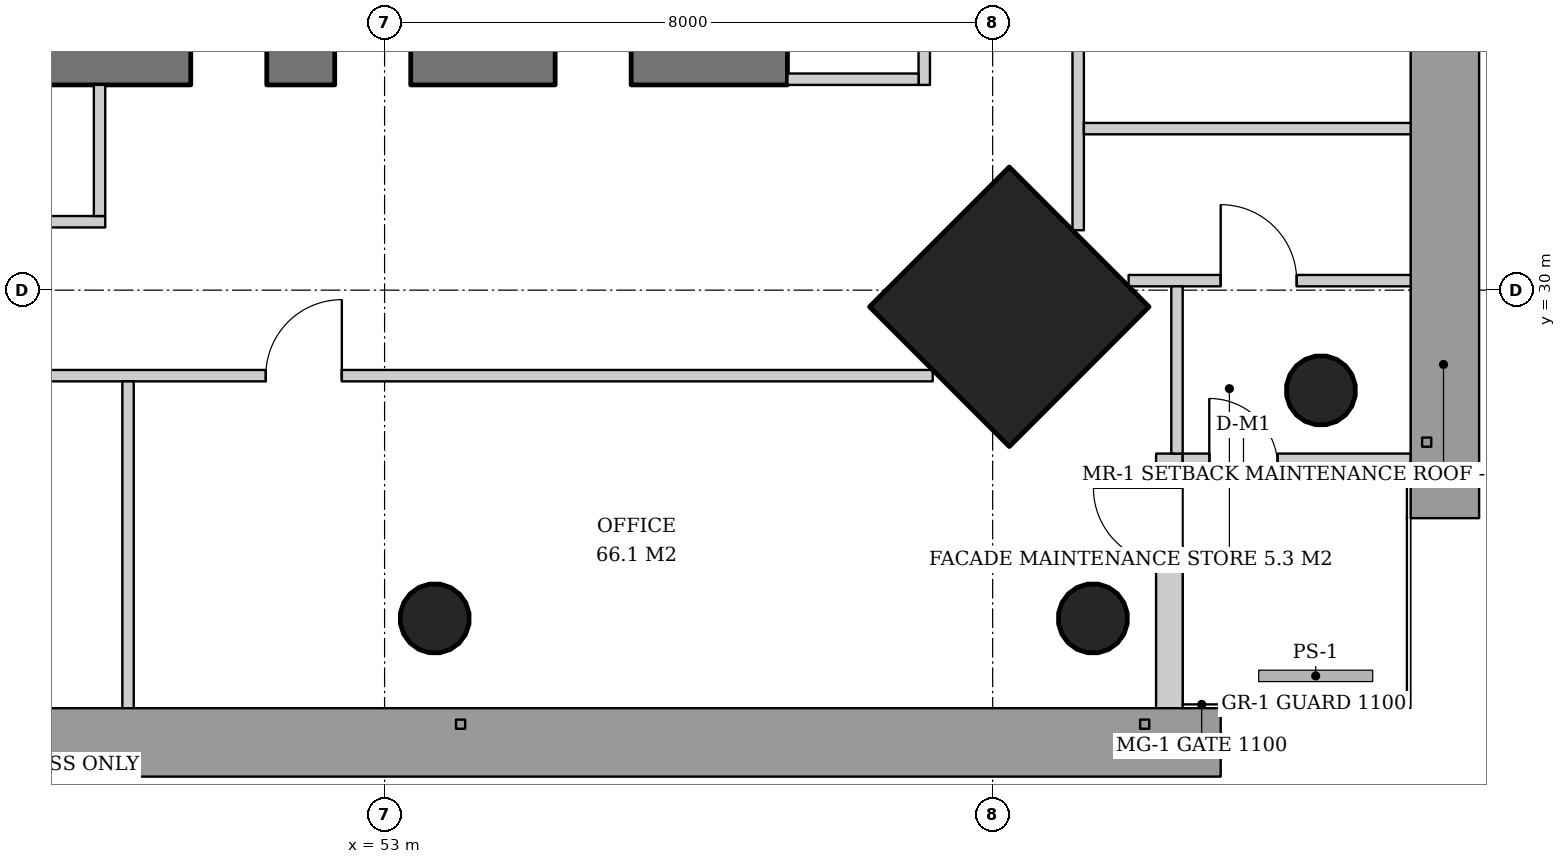
"""IFC4 building model, lengths in metres.
Left out: names, types, materials, properties, quantities, classifications, styles, units other than length and angle.
Written with IfcOpenShell. Run it as: python <this file> out.ifc"""

import sys

from ifc_helpers import new_model, si_unit, direction, frame, frame_2d, origin, origin_2d, place, context, subcontext, project, spatial, rectangle, hollow_circle, extrude, element, fill, save


model = new_model("IFC4")
c1 = context("Model", 3, precision=1e-05, world=origin(), true_north=direction((0.0, 1.0)))
c2 = subcontext(c1, "Body", "Model", "MODEL_VIEW")
j1 = project(units=[si_unit("LENGTHUNIT", "METRE"), si_unit("PLANEANGLEUNIT", "RADIAN")], contexts=[c1])
p1 = place(None, origin())
s1 = spatial("IfcSite", under=j1, at=p1, CompositionType="ELEMENT")
p2 = place(p1, origin())
s2 = spatial("IfcBuilding", under=s1, at=p2, CompositionType="ELEMENT")
p3 = place(p2, frame((0.0, 0.0, 135.0)))
s3 = spatial("IfcBuildingStorey", under=s2, at=p3, CompositionType="ELEMENT", Elevation=135.0)
p4 = place(p3, frame((65.357, 28.643, 0.0), z_axis=(-0.031962158256, 0.031962158256, 0.998977898093), x_axis=(-0.707106781187, -0.707106781187, 0.0)))
e1 = element("IfcColumn", 1, at=p4, inside=s3, PredefinedType="COLUMN", context=c2, shape_type="SweptSolid", body=[
    extrude(hollow_circle(Radius=0.457, WallThickness=0.03, at=origin_2d()), origin(), (0.0, 0.0, 1.0), 3.804),
])
p5 = place(p3, frame((61.257, 29.743, 0.0), z_axis=(-0.031898107953, 0.031898107953, 0.998981992539), x_axis=(-0.707106781187, -0.707106781187, 0.0)))
e2 = element("IfcColumn", 2, at=p5, inside=s3, PredefinedType="COLUMN", context=c2, shape_type="SweptSolid", body=[
    extrude(rectangle(XDim=2.6, YDim=2.6, at=origin_2d()), origin(), (0.0, 0.0, 1.0), 3.804),
])
p6 = place(p3, frame((62.357, 25.643, 0.0), z_axis=(-0.031962158256, 0.031962158256, 0.998977898093), x_axis=(-0.707106781187, -0.707106781187, 0.0)))
e3 = element("IfcColumn", 3, at=p6, inside=s3, PredefinedType="COLUMN", context=c2, shape_type="SweptSolid", body=[
    extrude(hollow_circle(Radius=0.457, WallThickness=0.03, at=origin_2d()), origin(), (0.0, 0.0, 1.0), 3.804),
])
p7 = place(p3, frame((53.678, 25.643, 0.0), z_axis=(-0.015923015547, 0.031974442509, 0.999361842679), x_axis=(-0.895145027055, -0.445775033553, 0.0)))
e4 = element("IfcColumn", 4, at=p7, inside=s3, PredefinedType="COLUMN", context=c2, shape_type="SweptSolid", body=[
    extrude(hollow_circle(Radius=0.457, WallThickness=0.03, at=origin_2d()), origin(), (0.0, 0.0, 1.0), 3.802),
])
p8 = place(p3, frame((31.7, 33.05, 0.0), z_axis=(0.0, 0.0, 1.0), x_axis=(1.0, 0.0, 0.0)))
e5 = element("IfcWall", 5, at=p8, inside=s3, PredefinedType="SHEAR", context=c2, shape_type="SweptSolid", body=[
    extrude(rectangle(XDim=26.6, YDim=0.7, at=frame_2d((13.3, 0.0))), origin(), (0.0, 0.0, 1.0), 3.8),
])
p9 = place(p8, frame((7.3, 0.0, 0.0)))
e6 = element("IfcOpeningElement", 6, at=p9, cuts=e5, PredefinedType="OPENING", context=c2, shape_type="SweptSolid", body=[
    extrude(rectangle(XDim=1.0, YDim=2.1, at=frame_2d((0.5, 1.05))), frame((0.0, 0.36, 0.0), z_axis=(0.0, -1.0, 0.0), x_axis=(1.0, 0.0, 0.0)), (0.0, 0.0, 1.0), 0.72),
])
p10 = place(p8, frame((18.75, 0.0, 0.0)))
e7 = element("IfcOpeningElement", 7, at=p10, cuts=e5, PredefinedType="OPENING", context=c2, shape_type="SweptSolid", body=[
    extrude(rectangle(XDim=1.0, YDim=2.1, at=frame_2d((0.5, 1.05))), frame((0.0, 0.36, 0.0), z_axis=(0.0, -1.0, 0.0), x_axis=(1.0, 0.0, 0.0)), (0.0, 0.0, 1.0), 0.72),
])
p11 = place(p8, frame((1.85, 0.0, 0.0)))
e8 = element("IfcOpeningElement", 8, at=p11, cuts=e5, PredefinedType="OPENING", context=c2, shape_type="SweptSolid", body=[
    extrude(rectangle(XDim=1.0, YDim=2.1, at=frame_2d((0.5, 1.05))), frame((0.0, 0.36, 0.0), z_axis=(0.0, -1.0, 0.0), x_axis=(1.0, 0.0, 0.0)), (0.0, 0.0, 1.0), 0.72),
])
p12 = place(p8, frame((4.7, 0.0, 0.0)))
e9 = element("IfcOpeningElement", 9, at=p12, cuts=e5, PredefinedType="OPENING", context=c2, shape_type="SweptSolid", body=[
    extrude(rectangle(XDim=1.0, YDim=2.1, at=frame_2d((0.5, 1.05))), frame((0.0, 0.36, 0.0), z_axis=(0.0, -1.0, 0.0), x_axis=(1.0, 0.0, 0.0)), (0.0, 0.0, 1.0), 0.72),
])
p13 = place(p8, frame((12.44, 0.0, 0.0)))
e10 = element("IfcOpeningElement", 10, at=p13, cuts=e5, PredefinedType="OPENING", context=c2, shape_type="SweptSolid", body=[
    extrude(rectangle(XDim=1.0, YDim=2.1, at=frame_2d((0.5, 1.05))), frame((0.0, 0.36, 0.0), z_axis=(0.0, -1.0, 0.0), x_axis=(1.0, 0.0, 0.0)), (0.0, 0.0, 1.0), 0.72),
])
p14 = place(p8, frame((20.644, 0.0, 0.0)))
e11 = element("IfcOpeningElement", 11, at=p14, cuts=e5, PredefinedType="OPENING", context=c2, shape_type="SweptSolid", body=[
    extrude(rectangle(XDim=1.0, YDim=2.1, at=frame_2d((0.5, 1.05))), frame((0.0, 0.36, 0.0), z_axis=(0.0, -1.0, 0.0), x_axis=(1.0, 0.0, 0.0)), (0.0, 0.0, 1.0), 0.72),
])
p15 = place(p8, frame((23.544, 0.0, 0.0)))
e12 = element("IfcOpeningElement", 12, at=p15, cuts=e5, PredefinedType="OPENING", context=c2, shape_type="SweptSolid", body=[
    extrude(rectangle(XDim=1.0, YDim=2.1, at=frame_2d((0.5, 1.05))), frame((0.0, 0.36, 0.0), z_axis=(0.0, -1.0, 0.0), x_axis=(1.0, 0.0, 0.0)), (0.0, 0.0, 1.0), 0.72),
])
p16 = place(p3, frame((63.325, 24.5, 0.0), z_axis=(0.0, 0.0, 1.0), x_axis=(0.0, 1.0, 0.0)))
e13 = element("IfcWall", 13, at=p16, inside=s3, PredefinedType="SOLIDWALL", context=c2, shape_type="SweptSolid", body=[
    extrude(rectangle(XDim=3.35, YDim=0.35, at=frame_2d((1.675, 0.0))), origin(), (0.0, 0.0, 1.0), 3.62),
])
p17 = place(p16, frame((1.9, 0.0, 0.0)))
e14 = element("IfcOpeningElement", 14, at=p17, cuts=e13, PredefinedType="OPENING", context=c2, shape_type="SweptSolid", body=[
    extrude(rectangle(XDim=1.0, YDim=2.4, at=frame_2d((0.5, 1.2))), frame((0.0, 0.185, 0.0), z_axis=(0.0, -1.0, 0.0), x_axis=(1.0, 0.0, 0.0)), (0.0, 0.0, 1.0), 0.37),
])
p18 = place(p3, frame((63.5, 27.675, 0.0), z_axis=(0.0, 0.0, 1.0), x_axis=(1.0, 0.0, 0.0)))
e15 = element("IfcWall", 15, at=p18, inside=s3, PredefinedType="SOLIDWALL", context=c2, shape_type="SweptSolid", body=[
    extrude(rectangle(XDim=3.0, YDim=0.35, at=frame_2d((1.5, 0.0))), origin(), (0.0, 0.0, 1.0), 3.62),
])
p19 = place(p18, frame((0.35, 0.0, 0.0)))
e16 = element("IfcOpeningElement", 16, at=p19, cuts=e15, PredefinedType="OPENING", context=c2, shape_type="SweptSolid", body=[
    extrude(rectangle(XDim=0.9, YDim=2.1, at=frame_2d((0.45, 1.05))), frame((0.0, 0.185, 0.0), z_axis=(0.0, -1.0, 0.0), x_axis=(1.0, 0.0, 0.0)), (0.0, 0.0, 1.0), 0.37),
])
p20 = place(p3, frame((60.1, 32.7, 0.0), z_axis=(0.0, 0.0, 1.0), x_axis=(0.0, 1.0, 0.0)))
e17 = element("IfcWall", 17, at=p20, inside=s3, PredefinedType="PARTITIONING", context=c2, shape_type="SweptSolid", body=[
    extrude(rectangle(XDim=11.275, YDim=0.15, at=frame_2d((5.638, 0.0))), origin(), (0.0, 0.0, 1.0), 2.72),
])
p21 = place(p20, frame((5.137, 0.0, 0.0)))
e18 = element("IfcOpeningElement", 18, at=p21, cuts=e17, PredefinedType="OPENING", context=c2, shape_type="SweptSolid", body=[
    extrude(rectangle(XDim=1.0, YDim=2.1, at=frame_2d((0.5, 1.05))), frame((0.0, 0.085, 0.0), z_axis=(0.0, -1.0, 0.0), x_axis=(1.0, 0.0, 0.0)), (0.0, 0.0, 1.0), 0.17),
])
p22 = place(p3, frame((58.3, 32.775, 0.0), z_axis=(0.0, 0.0, 1.0), x_axis=(1.0, 0.0, 0.0)))
e19 = element("IfcWall", 19, at=p22, inside=s3, PredefinedType="PARTITIONING", context=c2, shape_type="SweptSolid", body=[
    extrude(rectangle(XDim=1.725, YDim=0.15, at=frame_2d((0.862, 0.0))), origin(), (0.0, 0.0, 1.0), 3.62),
])
p23 = place(p3, frame((46.265, 30.9, 0.0), z_axis=(0.0, 0.0, 1.0), x_axis=(1.0, 0.0, 0.0)))
e20 = element("IfcWall", 20, at=p23, inside=s3, PredefinedType="PARTITIONING", context=c2, shape_type="SweptSolid", body=[
    extrude(rectangle(XDim=3.06, YDim=0.15, at=frame_2d((1.53, 0.0))), origin(), (0.0, 0.0, 1.0), 2.858),
])
p24 = place(p23, frame((1.03, 0.0, 0.0)))
e21 = element("IfcOpeningElement", 21, at=p24, cuts=e20, PredefinedType="OPENING", context=c2, shape_type="SweptSolid", body=[
    extrude(rectangle(XDim=1.0, YDim=2.1, at=frame_2d((0.5, 1.05))), frame((0.0, 0.085, 0.0), z_axis=(0.0, -1.0, 0.0), x_axis=(1.0, 0.0, 0.0)), (0.0, 0.0, 1.0), 0.17),
])
p25 = place(p3, frame((49.25, 32.7, 0.0), z_axis=(0.0, 0.0, 1.0), x_axis=(0.0, -1.0, 0.0)))
e22 = element("IfcWall", 22, at=p25, inside=s3, PredefinedType="PARTITIONING", context=c2, shape_type="SweptSolid", body=[
    extrude(rectangle(XDim=1.725, YDim=0.15, at=frame_2d((0.862, 0.0))), origin(), (0.0, 0.0, 1.0), 3.62),
])
p26 = place(p3, frame((62.125, 30.789, 0.0), z_axis=(0.0, 0.0, 1.0), x_axis=(0.0, 1.0, 0.0)))
e23 = element("IfcWall", 23, at=p26, inside=s3, PredefinedType="PARTITIONING", context=c2, shape_type="SweptSolid", body=[
    extrude(rectangle(XDim=30.423, YDim=0.15, at=frame_2d((15.211, 0.0))), origin(), (0.0, 0.0, 1.0), 2.72),
])
p27 = place(p26, frame((3.149, 0.0, 0.0)))
e24 = element("IfcOpeningElement", 24, at=p27, cuts=e23, PredefinedType="OPENING", context=c2, shape_type="SweptSolid", body=[
    extrude(rectangle(XDim=1.0, YDim=2.1, at=frame_2d((0.5, 1.05))), frame((0.0, 0.085, 0.0), z_axis=(0.0, -1.0, 0.0), x_axis=(1.0, 0.0, 0.0)), (0.0, 0.0, 1.0), 0.17),
])
p28 = place(p26, frame((7.774, 0.0, 0.0)))
e25 = element("IfcOpeningElement", 25, at=p28, cuts=e23, PredefinedType="OPENING", context=c2, shape_type="SweptSolid", body=[
    extrude(rectangle(XDim=1.0, YDim=2.1, at=frame_2d((0.5, 1.05))), frame((0.0, 0.085, 0.0), z_axis=(0.0, -1.0, 0.0), x_axis=(1.0, 0.0, 0.0)), (0.0, 0.0, 1.0), 0.17),
])
p29 = place(p26, frame((12.399, 0.0, 0.0)))
e26 = element("IfcOpeningElement", 26, at=p29, cuts=e23, PredefinedType="OPENING", context=c2, shape_type="SweptSolid", body=[
    extrude(rectangle(XDim=1.0, YDim=2.1, at=frame_2d((0.5, 1.05))), frame((0.0, 0.085, 0.0), z_axis=(0.0, -1.0, 0.0), x_axis=(1.0, 0.0, 0.0)), (0.0, 0.0, 1.0), 0.17),
])
p30 = place(p26, frame((17.024, 0.0, 0.0)))
e27 = element("IfcOpeningElement", 27, at=p30, cuts=e23, PredefinedType="OPENING", context=c2, shape_type="SweptSolid", body=[
    extrude(rectangle(XDim=1.0, YDim=2.1, at=frame_2d((0.5, 1.05))), frame((0.0, 0.085, 0.0), z_axis=(0.0, -1.0, 0.0), x_axis=(1.0, 0.0, 0.0)), (0.0, 0.0, 1.0), 0.17),
])
p31 = place(p26, frame((21.649, 0.0, 0.0)))
e28 = element("IfcOpeningElement", 28, at=p31, cuts=e23, PredefinedType="OPENING", context=c2, shape_type="SweptSolid", body=[
    extrude(rectangle(XDim=1.0, YDim=2.1, at=frame_2d((0.5, 1.05))), frame((0.0, 0.085, 0.0), z_axis=(0.0, -1.0, 0.0), x_axis=(1.0, 0.0, 0.0)), (0.0, 0.0, 1.0), 0.17),
])
p32 = place(p3, frame((62.2, 32.125, 0.0), z_axis=(0.0, 0.0, 1.0), x_axis=(1.0, 0.0, 0.0)))
e29 = element("IfcWall", 29, at=p32, inside=s3, PredefinedType="PARTITIONING", context=c2, shape_type="SweptSolid", body=[
    extrude(rectangle(XDim=4.34, YDim=0.15, at=frame_2d((2.17, 0.0))), origin(), (0.0, 0.0, 1.0), 2.82),
])
p33 = place(p3, frame((29.789, 28.875, 0.0), z_axis=(0.0, 0.0, 1.0), x_axis=(1.0, 0.0, 0.0)))
e30 = element("IfcWall", 30, at=p33, inside=s3, PredefinedType="PARTITIONING", context=c2, shape_type="SweptSolid", body=[
    extrude(rectangle(XDim=30.423, YDim=0.15, at=frame_2d((15.211, 0.0))), origin(), (0.0, 0.0, 1.0), 2.72),
])
p34 = place(p33, frame((3.149, 0.0, 0.0)))
e31 = element("IfcOpeningElement", 31, at=p34, cuts=e30, PredefinedType="OPENING", context=c2, shape_type="SweptSolid", body=[
    extrude(rectangle(XDim=1.0, YDim=2.1, at=frame_2d((0.5, 1.05))), frame((0.0, 0.085, 0.0), z_axis=(0.0, -1.0, 0.0), x_axis=(1.0, 0.0, 0.0)), (0.0, 0.0, 1.0), 0.17),
])
p35 = place(p33, frame((7.774, 0.0, 0.0)))
e32 = element("IfcOpeningElement", 32, at=p35, cuts=e30, PredefinedType="OPENING", context=c2, shape_type="SweptSolid", body=[
    extrude(rectangle(XDim=1.0, YDim=2.1, at=frame_2d((0.5, 1.05))), frame((0.0, 0.085, 0.0), z_axis=(0.0, -1.0, 0.0), x_axis=(1.0, 0.0, 0.0)), (0.0, 0.0, 1.0), 0.17),
])
p36 = place(p33, frame((12.399, 0.0, 0.0)))
e33 = element("IfcOpeningElement", 33, at=p36, cuts=e30, PredefinedType="OPENING", context=c2, shape_type="SweptSolid", body=[
    extrude(rectangle(XDim=1.0, YDim=2.1, at=frame_2d((0.5, 1.05))), frame((0.0, 0.085, 0.0), z_axis=(0.0, -1.0, 0.0), x_axis=(1.0, 0.0, 0.0)), (0.0, 0.0, 1.0), 0.17),
])
p37 = place(p33, frame((21.649, 0.0, 0.0)))
e34 = element("IfcOpeningElement", 34, at=p37, cuts=e30, PredefinedType="OPENING", context=c2, shape_type="SweptSolid", body=[
    extrude(rectangle(XDim=1.0, YDim=2.1, at=frame_2d((0.5, 1.05))), frame((0.0, 0.085, 0.0), z_axis=(0.0, -1.0, 0.0), x_axis=(1.0, 0.0, 0.0)), (0.0, 0.0, 1.0), 0.17),
])
p38 = place(p3, frame((49.625, 28.8, 0.0), z_axis=(0.0, 0.0, 1.0), x_axis=(0.0, -1.0, 0.0)))
e35 = element("IfcWall", 35, at=p38, inside=s3, PredefinedType="PARTITIONING", context=c2, shape_type="SweptSolid", body=[
    extrude(rectangle(XDim=4.34, YDim=0.15, at=frame_2d((2.17, 0.0))), origin(), (0.0, 0.0, 1.0), 2.82),
])
p39 = place(p3, frame((62.789, 30.125, 0.0), z_axis=(0.0, 0.0, 1.0), x_axis=(1.0, 0.0, 0.0)))
e36 = element("IfcWall", 36, at=p39, inside=s3, PredefinedType="PARTITIONING", context=c2, shape_type="SweptSolid", body=[
    extrude(rectangle(XDim=3.751, YDim=0.15, at=frame_2d((1.876, 0.0))), origin(), (0.0, 0.0, 1.0), 2.82),
])
p40 = place(p39, frame((1.211, 0.0, 0.0)))
e37 = element("IfcOpeningElement", 37, at=p40, cuts=e36, PredefinedType="OPENING", context=c2, shape_type="SweptSolid", body=[
    extrude(rectangle(XDim=1.0, YDim=2.1, at=frame_2d((0.5, 1.05))), frame((0.0, 0.085, 0.0), z_axis=(0.0, -1.0, 0.0), x_axis=(1.0, 0.0, 0.0)), (0.0, 0.0, 1.0), 0.17),
])
p41 = place(p3, frame((63.425, 30.05, 0.0), z_axis=(0.0, 0.0, 1.0), x_axis=(0.0, -1.0, 0.0)))
e38 = element("IfcWall", 38, at=p41, inside=s3, PredefinedType="PARTITIONING", context=c2, shape_type="SweptSolid", body=[
    extrude(rectangle(XDim=2.2, YDim=0.15, at=frame_2d((1.1, 0.0))), origin(), (0.0, 0.0, 1.0), 3.07),
])
p42 = place(p19, origin())
e39 = element("IfcDoor", 39, at=p42, inside=s3, OperationType="SINGLE_SWING_LEFT", PredefinedType="DOOR", context=c2, shape_type="SweptSolid", body=[
    extrude(rectangle(XDim=0.9, YDim=2.1, at=frame_2d((0.45, 1.05))), frame((0.0, 0.025, 0.0), z_axis=(0.0, -1.0, 0.0), x_axis=(1.0, 0.0, 0.0)), (0.0, 0.0, 1.0), 0.05),
])
fill(e16, e39)
p43 = place(p17, origin())
e40 = element("IfcDoor", 40, at=p43, inside=s3, OperationType="SINGLE_SWING_RIGHT", PredefinedType="DOOR", context=c2, shape_type="SweptSolid", body=[
    extrude(rectangle(XDim=1.0, YDim=2.4, at=frame_2d((0.5, 1.2))), frame((0.0, 0.025, 0.0), z_axis=(0.0, -1.0, 0.0), x_axis=(1.0, 0.0, 0.0)), (0.0, 0.0, 1.0), 0.05),
])
fill(e14, e40)
p44 = place(p10, origin())
e41 = element("IfcDoor", 41, at=p44, inside=s3, OperationType="SINGLE_SWING_RIGHT", PredefinedType="DOOR", context=c2, shape_type="SweptSolid", body=[
    extrude(rectangle(XDim=1.0, YDim=2.1, at=frame_2d((0.5, 1.05))), frame((0.0, 0.025, 0.0), z_axis=(0.0, -1.0, 0.0), x_axis=(1.0, 0.0, 0.0)), (0.0, 0.0, 1.0), 0.05),
])
fill(e7, e41)
p45 = place(p37, origin())
e42 = element("IfcDoor", 42, at=p45, inside=s3, OperationType="SINGLE_SWING_RIGHT", PredefinedType="DOOR", context=c2, shape_type="SweptSolid", body=[
    extrude(rectangle(XDim=1.0, YDim=2.1, at=frame_2d((0.5, 1.05))), frame((0.0, 0.025, 0.0), z_axis=(0.0, -1.0, 0.0), x_axis=(1.0, 0.0, 0.0)), (0.0, 0.0, 1.0), 0.05),
])
fill(e34, e42)
p46 = place(p40, origin())
e43 = element("IfcDoor", 43, at=p46, inside=s3, OperationType="SINGLE_SWING_LEFT", PredefinedType="DOOR", context=c2, shape_type="SweptSolid", body=[
    extrude(rectangle(XDim=1.0, YDim=2.1, at=frame_2d((0.5, 1.05))), frame((0.0, 0.025, 0.0), z_axis=(0.0, -1.0, 0.0), x_axis=(1.0, 0.0, 0.0)), (0.0, 0.0, 1.0), 0.05),
])
fill(e37, e43)
save(model, sys.argv[1])
